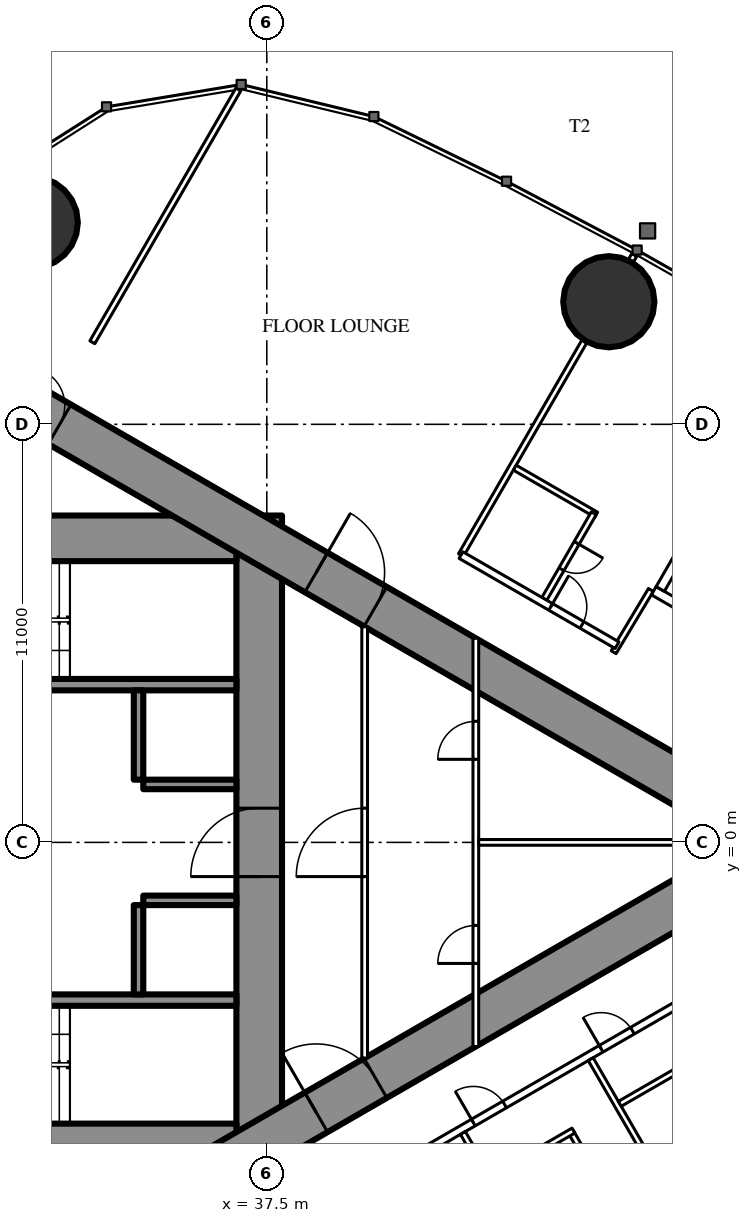
"""IFC4 building model, lengths in metres.
Left out: names, types, materials, properties, quantities, classifications, styles, units other than length and angle.
Written with IfcOpenShell. Run it as: python <this file> out.ifc"""

import sys

from ifc_helpers import new_model, si_unit, direction, frame, frame_2d, origin, origin_2d, place, context, subcontext, project, spatial, rectangle, circle, extrude, element, fill, save


model = new_model("IFC4")
c1 = context("Model", 3, precision=1e-05, world=origin(), true_north=direction((0.0, 1.0)))
c2 = subcontext(c1, "Body", "Model", "MODEL_VIEW")
j1 = project(units=[si_unit("LENGTHUNIT", "METRE"), si_unit("PLANEANGLEUNIT", "RADIAN")], contexts=[c1])
p1 = place(None, origin())
s1 = spatial("IfcSite", under=j1, at=p1, CompositionType="ELEMENT")
p2 = place(p1, origin())
s2 = spatial("IfcBuilding", under=s1, at=p2, CompositionType="ELEMENT")
p3 = place(p2, frame((0.0, 0.0, 240.5)))
s3 = spatial("IfcBuildingStorey", under=s2, at=p3, CompositionType="ELEMENT", Elevation=240.5)
for number, where, z_axis, x_axis in (
    (1, (31.328, 16.311, 0.0), (0.0, 0.0, 1.0), (1.0, 0.0, 0.0)),
    (2, (46.499, 14.226, 0.0), (0.0, 0.0, 1.0), (1.0, 0.0, 0.0)),
):
    element("IfcColumn", number, at=place(p3, frame(where, z_axis=z_axis, x_axis=x_axis)), inside=s3, PredefinedType="COLUMN", context=c2, shape_type="SweptSolid", body=[
        extrude(circle(Radius=1.2, at=origin_2d()), origin(), (0.0, 0.0, 1.0), 3.6),
    ])
p4 = place(p3, frame((37.3, -8.6, 0.0), z_axis=(0.0, 0.0, 1.0), x_axis=(0.0, 1.0, 0.0)))
e3 = element("IfcWall", 3, at=p4, inside=s3, PredefinedType="SHEAR", context=c2, shape_type="SweptSolid", body=[
    extrude(rectangle(XDim=17.2, YDim=1.2, at=frame_2d((8.6, 0.0))), origin(), (0.0, 0.0, 1.0), 3.6),
])
p5 = place(p4, frame((7.7, 0.0, 0.0)))
e4 = element("IfcOpeningElement", 4, at=p5, cuts=e3, PredefinedType="OPENING", context=c2, shape_type="SweptSolid", body=[
    extrude(rectangle(XDim=1.8, YDim=2.2, at=frame_2d((0.9, 1.1))), frame((0.0, 0.61, 0.0), z_axis=(0.0, -1.0, 0.0), x_axis=(1.0, 0.0, 0.0)), (0.0, 0.0, 1.0), 1.22),
])
p6 = place(p3, frame((28.3, -8.0, 0.0), z_axis=(0.0, 0.0, 1.0), x_axis=(1.0, 0.0, 0.0)))
e5 = element("IfcWall", 5, at=p6, inside=s3, PredefinedType="SHEAR", context=c2, shape_type="SweptSolid", body=[
    extrude(rectangle(XDim=8.4, YDim=1.2, at=frame_2d((4.2, 0.0))), origin(), (0.0, 0.0, 1.0), 3.6),
])
p7 = place(p6, frame((0.25, 0.0, 0.0)))
e6 = element("IfcOpeningElement", 6, at=p7, cuts=e5, PredefinedType="OPENING", context=c2, shape_type="SweptSolid", body=[
    extrude(rectangle(XDim=1.0, YDim=2.2, at=frame_2d((0.5, 1.1))), frame((0.0, 0.61, 0.0), z_axis=(0.0, -1.0, 0.0), x_axis=(1.0, 0.0, 0.0)), (0.0, 0.0, 1.0), 1.22),
])
p8 = place(p3, frame((28.3, 8.0, 0.0), z_axis=(0.0, 0.0, 1.0), x_axis=(1.0, 0.0, 0.0)))
e7 = element("IfcWall", 7, at=p8, inside=s3, PredefinedType="SHEAR", context=c2, shape_type="SweptSolid", body=[
    extrude(rectangle(XDim=8.4, YDim=1.2, at=frame_2d((4.2, 0.0))), origin(), (0.0, 0.0, 1.0), 3.6),
])
p9 = place(p8, frame((0.25, 0.0, 0.0)))
e8 = element("IfcOpeningElement", 8, at=p9, cuts=e7, PredefinedType="OPENING", context=c2, shape_type="SweptSolid", body=[
    extrude(rectangle(XDim=1.0, YDim=2.2, at=frame_2d((0.5, 1.1))), frame((0.0, 0.61, 0.0), z_axis=(0.0, -1.0, 0.0), x_axis=(1.0, 0.0, 0.0)), (0.0, 0.0, 1.0), 1.22),
])
for number, where, z_axis, x_axis in (
    (9, (28.3, -4.15, 0.0), (0.0, 0.0, 1.0), (1.0, 0.0, 0.0)),
    (10, (28.3, 4.15, 0.0), (0.0, 0.0, 1.0), (1.0, 0.0, 0.0)),
):
    element("IfcWall", number, at=place(p3, frame(where, z_axis=z_axis, x_axis=x_axis)), inside=s3, PredefinedType="SHEAR", context=c2, shape_type="SweptSolid", body=[
        extrude(rectangle(XDim=8.4, YDim=0.3, at=frame_2d((4.2, 0.0))), origin(), (0.0, 0.0, 1.0), 3.6),
    ])
p10 = place(p3, frame((34.125, -4.0, 0.0), z_axis=(0.0, 0.0, 1.0), x_axis=(0.0, 1.0, 0.0)))
e11 = element("IfcWall", 11, at=p10, inside=s3, PredefinedType="SHEAR", context=c2, shape_type="SweptSolid", body=[
    extrude(rectangle(XDim=2.35, YDim=0.25, at=frame_2d((1.175, 0.0))), origin(), (0.0, 0.0, 1.0), 3.6),
])
p11 = place(p3, frame((34.25, -1.525, 0.0), z_axis=(0.0, 0.0, 1.0), x_axis=(1.0, 0.0, 0.0)))
e12 = element("IfcWall", 12, at=p11, inside=s3, PredefinedType="SHEAR", context=c2, shape_type="SweptSolid", body=[
    extrude(rectangle(XDim=2.45, YDim=0.25, at=frame_2d((1.225, 0.0))), origin(), (0.0, 0.0, 1.0), 3.6),
])
p12 = place(p3, frame((34.125, 1.65, 0.0), z_axis=(0.0, 0.0, 1.0), x_axis=(0.0, 1.0, 0.0)))
e13 = element("IfcWall", 13, at=p12, inside=s3, PredefinedType="SHEAR", context=c2, shape_type="SweptSolid", body=[
    extrude(rectangle(XDim=2.35, YDim=0.25, at=frame_2d((1.175, 0.0))), origin(), (0.0, 0.0, 1.0), 3.6),
])
p13 = place(p3, frame((34.25, 1.525, 0.0), z_axis=(0.0, 0.0, 1.0), x_axis=(1.0, 0.0, 0.0)))
e14 = element("IfcWall", 14, at=p13, inside=s3, PredefinedType="SHEAR", context=c2, shape_type="SweptSolid", body=[
    extrude(rectangle(XDim=2.45, YDim=0.25, at=frame_2d((1.225, 0.0))), origin(), (0.0, 0.0, 1.0), 3.6),
])
p14 = place(p3, frame((27.2, -13.8, 0.0), z_axis=(0.0, 0.0, 1.0), x_axis=(0.866027159892, 0.499996958321, 0.0)))
e15 = element("IfcWall", 15, at=p14, inside=s3, PredefinedType="SHEAR", context=c2, shape_type="SweptSolid", body=[
    extrude(rectangle(XDim=27.947, YDim=1.2, at=frame_2d((13.973, 0.0))), origin(), (0.0, 0.0, 1.0), 3.6),
])
p15 = place(p14, frame((4.6, 0.0, 0.0)))
e16 = element("IfcOpeningElement", 16, at=p15, cuts=e15, PredefinedType="OPENING", context=c2, shape_type="SweptSolid", body=[
    extrude(rectangle(XDim=1.0, YDim=2.2, at=frame_2d((0.5, 1.1))), frame((0.0, 0.61, 0.0), z_axis=(0.0, -1.0, 0.0), x_axis=(1.0, 0.0, 0.0)), (0.0, 0.0, 1.0), 1.22),
])
p16 = place(p14, frame((13.395, 0.0, 0.0)))
e17 = element("IfcOpeningElement", 17, at=p16, cuts=e15, PredefinedType="OPENING", context=c2, shape_type="SweptSolid", body=[
    extrude(rectangle(XDim=1.8, YDim=2.2, at=frame_2d((0.9, 1.1))), frame((0.0, 0.61, 0.0), z_axis=(0.0, -1.0, 0.0), x_axis=(1.0, 0.0, 0.0)), (0.0, 0.0, 1.0), 1.22),
])
p17 = place(p3, frame((27.2, 13.8, 0.0), z_axis=(0.0, 0.0, 1.0), x_axis=(0.866024515034, -0.500001539357, 0.0)))
e18 = element("IfcWall", 18, at=p17, inside=s3, PredefinedType="SHEAR", context=c2, shape_type="SweptSolid", body=[
    extrude(rectangle(XDim=26.907, YDim=1.2, at=frame_2d((13.454, 0.0))), origin(), (0.0, 0.0, 1.0), 3.6),
])
p18 = place(p17, frame((4.6, 0.0, 0.0)))
e19 = element("IfcOpeningElement", 19, at=p18, cuts=e18, PredefinedType="OPENING", context=c2, shape_type="SweptSolid", body=[
    extrude(rectangle(XDim=1.0, YDim=2.2, at=frame_2d((0.5, 1.1))), frame((0.0, 0.61, 0.0), z_axis=(0.0, -1.0, 0.0), x_axis=(1.0, 0.0, 0.0)), (0.0, 0.0, 1.0), 1.22),
])
p19 = place(p17, frame((13.395, 0.0, 0.0)))
e20 = element("IfcOpeningElement", 20, at=p19, cuts=e18, PredefinedType="OPENING", context=c2, shape_type="SweptSolid", body=[
    extrude(rectangle(XDim=1.8, YDim=2.2, at=frame_2d((0.9, 1.1))), frame((0.0, 0.61, 0.0), z_axis=(0.0, -1.0, 0.0), x_axis=(1.0, 0.0, 0.0)), (0.0, 0.0, 1.0), 1.22),
])
p20 = place(p3, frame((28.959, -15.44, 0.0), z_axis=(0.0, 0.0, 1.0), x_axis=(0.866025227435, 0.500000305447, 0.0)))
e21 = element("IfcWall", 21, at=p20, inside=s3, PredefinedType="PARTITIONING", context=c2, shape_type="SweptSolid", body=[
    extrude(rectangle(XDim=30.88, YDim=0.2, at=frame_2d((15.44, 0.0))), origin(), (0.0, 0.0, 1.0), 3.35),
])
p21 = place(p20, frame((1.494, 0.0, 0.0)))
e22 = element("IfcOpeningElement", 22, at=p21, cuts=e21, PredefinedType="OPENING", context=c2, shape_type="SweptSolid", body=[
    extrude(rectangle(XDim=1.8, YDim=2.03, at=frame_2d((0.9, 1.015))), frame((0.0, 0.11, 0.0), z_axis=(0.0, -1.0, 0.0), x_axis=(1.0, 0.0, 0.0)), (0.0, 0.0, 1.0), 0.22),
])
p22 = place(p20, frame((7.687, 0.0, 0.0)))
e23 = element("IfcOpeningElement", 23, at=p22, cuts=e21, PredefinedType="OPENING", context=c2, shape_type="SweptSolid", body=[
    extrude(rectangle(XDim=1.0, YDim=2.2, at=frame_2d((0.5, 1.1))), frame((0.0, 0.11, 0.0), z_axis=(0.0, -1.0, 0.0), x_axis=(1.0, 0.0, 0.0)), (0.0, 0.0, 1.0), 0.22),
])
p23 = place(p20, frame((16.137, 0.0, 0.0)))
e24 = element("IfcOpeningElement", 24, at=p23, cuts=e21, PredefinedType="OPENING", context=c2, shape_type="SweptSolid", body=[
    extrude(rectangle(XDim=0.95, YDim=2.2, at=frame_2d((0.475, 1.1))), frame((0.0, 0.11, 0.0), z_axis=(0.0, -1.0, 0.0), x_axis=(1.0, 0.0, 0.0)), (0.0, 0.0, 1.0), 0.22),
])
p24 = place(p20, frame((20.021, 0.0, 0.0)))
e25 = element("IfcOpeningElement", 25, at=p24, cuts=e21, PredefinedType="OPENING", context=c2, shape_type="SweptSolid", body=[
    extrude(rectangle(XDim=0.95, YDim=2.2, at=frame_2d((0.475, 1.1))), frame((0.0, 0.11, 0.0), z_axis=(0.0, -1.0, 0.0), x_axis=(1.0, 0.0, 0.0)), (0.0, 0.0, 1.0), 0.22),
])
p25 = place(p20, frame((26.253, 0.0, 0.0)))
e26 = element("IfcOpeningElement", 26, at=p25, cuts=e21, PredefinedType="OPENING", context=c2, shape_type="SweptSolid", body=[
    extrude(rectangle(XDim=0.95, YDim=2.2, at=frame_2d((0.475, 1.1))), frame((0.0, 0.11, 0.0), z_axis=(0.0, -1.0, 0.0), x_axis=(1.0, 0.0, 0.0)), (0.0, 0.0, 1.0), 0.22),
])
p26 = place(p3, frame((42.66, -7.646, 0.0), z_axis=(0.0, 0.0, 1.0), x_axis=(0.499996592859, -0.866027370889, 0.0)))
e27 = element("IfcWall", 27, at=p26, inside=s3, PredefinedType="PARTITIONING", context=c2, shape_type="SweptSolid", body=[
    extrude(rectangle(XDim=6.398, YDim=0.15, at=frame_2d((3.199, 0.0))), origin(), (0.0, 0.0, 1.0), 2.45),
])
p27 = place(p3, frame((46.023, -5.704, 0.0), z_axis=(0.0, 0.0, 1.0), x_axis=(0.499984478165, -0.866034365135, 0.0)))
e28 = element("IfcWall", 28, at=p27, inside=s3, PredefinedType="PARTITIONING", context=c2, shape_type="SweptSolid", body=[
    extrude(rectangle(XDim=6.426, YDim=0.15, at=frame_2d((3.213, 0.0))), origin(), (0.0, 0.0, 1.0), 2.45),
])
p28 = place(p3, frame((32.91, 13.159, 0.0), z_axis=(0.0, 0.0, 1.0), x_axis=(0.500014963534, 0.866016764412, 0.0)))
e29 = element("IfcWall", 29, at=p28, inside=s3, PredefinedType="PARTITIONING", context=c2, shape_type="SweptSolid", body=[
    extrude(rectangle(XDim=7.682, YDim=0.15, at=frame_2d((3.841, 0.0))), origin(), (0.0, 0.0, 1.0), 3.35),
])
p29 = place(p3, frame((42.61, 7.559, 0.0), z_axis=(0.0, 0.0, 1.0), x_axis=(0.500014058812, 0.866017286774, 0.0)))
e30 = element("IfcWall", 30, at=p29, inside=s3, PredefinedType="PARTITIONING", context=c2, shape_type="SweptSolid", body=[
    extrude(rectangle(XDim=6.498, YDim=0.15, at=frame_2d((3.249, 0.0))), origin(), (0.0, 0.0, 1.0), 2.45),
])
p30 = place(p3, frame((47.079, 15.3, 0.0), z_axis=(0.0, 0.0, 1.0), x_axis=(0.499212083968, 0.866479829667, 0.0)))
e31 = element("IfcWall", 31, at=p30, inside=s3, PredefinedType="PARTITIONING", context=c2, shape_type="SweptSolid", body=[
    extrude(rectangle(XDim=0.179, YDim=0.15, at=frame_2d((0.09, 0.0))), origin(), (0.0, 0.0, 1.0), 2.45),
])
p31 = place(p3, frame((47.606, 6.642, 0.0), z_axis=(0.0, 0.0, 1.0), x_axis=(-0.51353662755, -0.858067673418, 0.0)))
e32 = element("IfcWall", 32, at=p31, inside=s3, PredefinedType="PARTITIONING", context=c2, shape_type="SweptSolid", body=[
    extrude(rectangle(XDim=1.91, YDim=0.15, at=frame_2d((0.955, 0.0))), origin(), (0.0, 0.0, 1.0), 3.35),
])
p32 = place(p3, frame((45.503, -7.621, 0.0), z_axis=(0.0, 0.0, 1.0), x_axis=(0.500006934395, -0.866021400173, 0.0)))
e33 = element("IfcWall", 33, at=p32, inside=s3, PredefinedType="PARTITIONING", context=c2, shape_type="SweptSolid", body=[
    extrude(rectangle(XDim=2.6, YDim=0.15, at=frame_2d((1.3, 0.0))), origin(), (0.0, 0.0, 1.0), 3.35),
])
p33 = place(p32, frame((0.9, 0.0, 0.0)))
e34 = element("IfcOpeningElement", 34, at=p33, cuts=e33, PredefinedType="OPENING", context=c2, shape_type="SweptSolid", body=[
    extrude(rectangle(XDim=0.8, YDim=2.2, at=frame_2d((0.4, 1.1))), frame((0.0, 0.085, 0.0), z_axis=(0.0, -1.0, 0.0), x_axis=(1.0, 0.0, 0.0)), (0.0, 0.0, 1.0), 0.17),
])
for number, where, z_axis, x_axis in (
    (35, (43.425, -8.821, 0.0), (0.0, 0.0, 1.0), (0.866, 0.5, 0.0)),
    (36, (48.088, -9.13, 0.0), (0.0, 0.0, 1.0), (0.866, 0.5, 0.0)),
    (37, (46.788, -6.879, 0.0), (0.0, 0.0, 1.0), (0.866, 0.5, 0.0)),
    (38, (44.025, 9.86, 0.0), (0.0, 0.0, 1.0), (0.866, -0.5, 0.0)),
):
    element("IfcWall", number, at=place(p3, frame(where, z_axis=z_axis, x_axis=x_axis)), inside=s3, PredefinedType="PARTITIONING", context=c2, shape_type="SweptSolid", body=[
        extrude(rectangle(XDim=2.475, YDim=0.15, at=frame_2d((1.237, 0.0))), origin(), (0.0, 0.0, 1.0), 3.35),
    ])
p34 = place(p3, frame((44.803, 6.408, 0.0), z_axis=(0.0, 0.0, 1.0), x_axis=(0.500047596559, 0.865997922154, 0.0)))
e39 = element("IfcWall", 39, at=p34, inside=s3, PredefinedType="PARTITIONING", context=c2, shape_type="SweptSolid", body=[
    extrude(rectangle(XDim=2.6, YDim=0.15, at=frame_2d((1.3, 0.0))), origin(), (0.0, 0.0, 1.0), 3.35),
])
p35 = place(p34, frame((0.9, 0.0, 0.0)))
e40 = element("IfcOpeningElement", 40, at=p35, cuts=e39, PredefinedType="OPENING", context=c2, shape_type="SweptSolid", body=[
    extrude(rectangle(XDim=0.8, YDim=2.2, at=frame_2d((0.4, 1.1))), frame((0.0, 0.085, 0.0), z_axis=(0.0, -1.0, 0.0), x_axis=(1.0, 0.0, 0.0)), (0.0, 0.0, 1.0), 0.17),
])
p36 = place(p3, frame((42.61, 7.559, 0.0), z_axis=(0.0, 0.0, 1.0), x_axis=(0.866032081755, -0.499988433238, 0.0)))
e41 = element("IfcWall", 41, at=p36, inside=s3, PredefinedType="PARTITIONING", context=c2, shape_type="SweptSolid", body=[
    extrude(rectangle(XDim=4.741, YDim=0.2, at=frame_2d((2.37, 0.0))), origin(), (0.0, 0.0, 1.0), 3.35),
])
p37 = place(p36, frame((2.725, 0.0, 0.0)))
e42 = element("IfcOpeningElement", 42, at=p37, cuts=e41, PredefinedType="OPENING", context=c2, shape_type="SweptSolid", body=[
    extrude(rectangle(XDim=0.95, YDim=2.2, at=frame_2d((0.475, 1.1))), frame((0.0, 0.11, 0.0), z_axis=(0.0, -1.0, 0.0), x_axis=(1.0, 0.0, 0.0)), (0.0, 0.0, 1.0), 0.22),
])
p38 = place(p3, frame((40.075, -5.674, 0.0), z_axis=(0.0, 0.0, 1.0), x_axis=(0.0, 1.0, 0.0)))
e43 = element("IfcWall", 43, at=p38, inside=s3, PredefinedType="PARTITIONING", context=c2, shape_type="SweptSolid", body=[
    extrude(rectangle(XDim=11.348, YDim=0.15, at=frame_2d((5.674, 0.0))), origin(), (0.0, 0.0, 1.0), 3.35),
])
p39 = place(p38, frame((4.774, 0.0, 0.0)))
e44 = element("IfcOpeningElement", 44, at=p39, cuts=e43, PredefinedType="OPENING", context=c2, shape_type="SweptSolid", body=[
    extrude(rectangle(XDim=1.8, YDim=2.2, at=frame_2d((0.9, 1.1))), frame((0.0, 0.085, 0.0), z_axis=(0.0, -1.0, 0.0), x_axis=(1.0, 0.0, 0.0)), (0.0, 0.0, 1.0), 0.17),
])
p40 = place(p3, frame((43.0, -5.371, 0.0), z_axis=(0.0, 0.0, 1.0), x_axis=(0.0, 1.0, 0.0)))
e45 = element("IfcWall", 45, at=p40, inside=s3, PredefinedType="PARTITIONING", context=c2, shape_type="SweptSolid", body=[
    extrude(rectangle(XDim=10.741, YDim=0.15, at=frame_2d((5.371, 0.0))), origin(), (0.0, 0.0, 1.0), 3.35),
])
p41 = place(p40, frame((2.185, 0.0, 0.0)))
e46 = element("IfcOpeningElement", 46, at=p41, cuts=e45, PredefinedType="OPENING", context=c2, shape_type="SweptSolid", body=[
    extrude(rectangle(XDim=1.0, YDim=2.2, at=frame_2d((0.5, 1.1))), frame((0.0, 0.085, 0.0), z_axis=(0.0, -1.0, 0.0), x_axis=(1.0, 0.0, 0.0)), (0.0, 0.0, 1.0), 0.17),
])
p42 = place(p40, frame((7.556, 0.0, 0.0)))
e47 = element("IfcOpeningElement", 47, at=p42, cuts=e45, PredefinedType="OPENING", context=c2, shape_type="SweptSolid", body=[
    extrude(rectangle(XDim=1.0, YDim=2.2, at=frame_2d((0.5, 1.1))), frame((0.0, 0.085, 0.0), z_axis=(0.0, -1.0, 0.0), x_axis=(1.0, 0.0, 0.0)), (0.0, 0.0, 1.0), 0.17),
])
p43 = place(p3, frame((43.075, 0.0, 0.0), z_axis=(0.0, 0.0, 1.0), x_axis=(1.0, 0.0, 0.0)))
e48 = element("IfcWall", 48, at=p43, inside=s3, PredefinedType="PARTITIONING", context=c2, shape_type="SweptSolid", body=[
    extrude(rectangle(XDim=9.227, YDim=0.15, at=frame_2d((4.614, 0.0))), origin(), (0.0, 0.0, 1.0), 2.45),
])
p44 = place(p3, frame((47.681, 6.622, 0.0), z_axis=(0.0, 0.0, 1.0), x_axis=(0.86603344179, -0.499986077507, 0.0)))
e49 = element("IfcWall", 49, at=p44, inside=s3, PredefinedType="PARTITIONING", context=c2, shape_type="SweptSolid", body=[
    extrude(rectangle(XDim=6.6, YDim=0.25, at=frame_2d((3.3, 0.0))), origin(), (0.0, 0.0, 1.0), 3.35),
])
p45 = place(p44, frame((0.75, 0.0, 0.0)))
e50 = element("IfcOpeningElement", 50, at=p45, cuts=e49, PredefinedType="OPENING", context=c2, shape_type="SweptSolid", body=[
    extrude(rectangle(XDim=1.1, YDim=2.2, at=frame_2d((0.55, 1.1))), frame((0.0, 0.135, 0.0), z_axis=(0.0, -1.0, 0.0), x_axis=(1.0, 0.0, 0.0)), (0.0, 0.0, 1.0), 0.27),
])
p46 = place(p44, frame((2.75, 0.0, 0.0)))
e51 = element("IfcOpeningElement", 51, at=p46, cuts=e49, PredefinedType="OPENING", context=c2, shape_type="SweptSolid", body=[
    extrude(rectangle(XDim=1.1, YDim=2.2, at=frame_2d((0.55, 1.1))), frame((0.0, 0.135, 0.0), z_axis=(0.0, -1.0, 0.0), x_axis=(1.0, 0.0, 0.0)), (0.0, 0.0, 1.0), 0.27),
])
p47 = place(p44, frame((4.75, 0.0, 0.0)))
e52 = element("IfcOpeningElement", 52, at=p47, cuts=e49, PredefinedType="OPENING", context=c2, shape_type="SweptSolid", body=[
    extrude(rectangle(XDim=1.1, YDim=2.2, at=frame_2d((0.55, 1.1))), frame((0.0, 0.135, 0.0), z_axis=(0.0, -1.0, 0.0), x_axis=(1.0, 0.0, 0.0)), (0.0, 0.0, 1.0), 0.27),
])
p48 = place(p3, frame((47.852, 6.668, 0.0), z_axis=(0.0, 0.0, 1.0), x_axis=(0.499929347863, 0.866066190972, 0.0)))
e53 = element("IfcWall", 53, at=p48, inside=s3, PredefinedType="PARTITIONING", context=c2, shape_type="SweptSolid", body=[
    extrude(rectangle(XDim=3.201, YDim=0.25, at=frame_2d((1.6, 0.0))), origin(), (0.0, 0.0, 1.0), 3.35),
])
p49 = place(p23, origin())
e54 = element("IfcDoor", 54, at=p49, inside=s3, OperationType="SINGLE_SWING_LEFT", PredefinedType="DOOR", context=c2, shape_type="SweptSolid", body=[
    extrude(rectangle(XDim=0.95, YDim=2.2, at=frame_2d((0.475, 1.1))), frame((0.0, 0.025, 0.0), z_axis=(0.0, -1.0, 0.0), x_axis=(1.0, 0.0, 0.0)), (0.0, 0.0, 1.0), 0.05),
])
fill(e24, e54)
p50 = place(p24, origin())
e55 = element("IfcDoor", 55, at=p50, inside=s3, OperationType="SINGLE_SWING_LEFT", PredefinedType="DOOR", context=c2, shape_type="SweptSolid", body=[
    extrude(rectangle(XDim=0.95, YDim=2.2, at=frame_2d((0.475, 1.1))), frame((0.0, 0.025, 0.0), z_axis=(0.0, -1.0, 0.0), x_axis=(1.0, 0.0, 0.0)), (0.0, 0.0, 1.0), 0.05),
])
fill(e25, e55)
p51 = place(p35, origin())
e56 = element("IfcDoor", 56, at=p51, inside=s3, OperationType="SINGLE_SWING_RIGHT", PredefinedType="DOOR", context=c2, shape_type="SweptSolid", body=[
    extrude(rectangle(XDim=0.8, YDim=2.2, at=frame_2d((0.4, 1.1))), frame((0.0, 0.025, 0.0), z_axis=(0.0, -1.0, 0.0), x_axis=(1.0, 0.0, 0.0)), (0.0, 0.0, 1.0), 0.05),
])
fill(e40, e56)
p52 = place(p37, origin())
e57 = element("IfcDoor", 57, at=p52, inside=s3, OperationType="SINGLE_SWING_LEFT", PredefinedType="DOOR", context=c2, shape_type="SweptSolid", body=[
    extrude(rectangle(XDim=0.95, YDim=2.2, at=frame_2d((0.475, 1.1))), frame((0.0, 0.025, 0.0), z_axis=(0.0, -1.0, 0.0), x_axis=(1.0, 0.0, 0.0)), (0.0, 0.0, 1.0), 0.05),
])
fill(e42, e57)
p53 = place(p39, origin())
e58 = element("IfcDoor", 58, at=p53, inside=s3, OperationType="DOUBLE_DOOR_SINGLE_SWING", PredefinedType="DOOR", context=c2, shape_type="SweptSolid", body=[
    extrude(rectangle(XDim=1.8, YDim=2.2, at=frame_2d((0.9, 1.1))), frame((0.0, 0.025, 0.0), z_axis=(0.0, -1.0, 0.0), x_axis=(1.0, 0.0, 0.0)), (0.0, 0.0, 1.0), 0.05),
])
fill(e44, e58)
p54 = place(p41, origin())
e59 = element("IfcDoor", 59, at=p54, inside=s3, OperationType="SINGLE_SWING_LEFT", PredefinedType="DOOR", context=c2, shape_type="SweptSolid", body=[
    extrude(rectangle(XDim=1.0, YDim=2.2, at=frame_2d((0.5, 1.1))), frame((0.0, 0.025, 0.0), z_axis=(0.0, -1.0, 0.0), x_axis=(1.0, 0.0, 0.0)), (0.0, 0.0, 1.0), 0.05),
])
fill(e46, e59)
p55 = place(p42, origin())
e60 = element("IfcDoor", 60, at=p55, inside=s3, OperationType="SINGLE_SWING_LEFT", PredefinedType="DOOR", context=c2, shape_type="SweptSolid", body=[
    extrude(rectangle(XDim=1.0, YDim=2.2, at=frame_2d((0.5, 1.1))), frame((0.0, 0.025, 0.0), z_axis=(0.0, -1.0, 0.0), x_axis=(1.0, 0.0, 0.0)), (0.0, 0.0, 1.0), 0.05),
])
fill(e47, e60)
p56 = place(p16, origin())
e61 = element("IfcDoor", 61, at=p56, inside=s3, OperationType="DOUBLE_DOOR_SINGLE_SWING", PredefinedType="DOOR", context=c2, shape_type="SweptSolid", body=[
    extrude(rectangle(XDim=1.8, YDim=2.2, at=frame_2d((0.9, 1.1))), frame((0.0, 0.025, 0.0), z_axis=(0.0, -1.0, 0.0), x_axis=(1.0, 0.0, 0.0)), (0.0, 0.0, 1.0), 0.05),
])
fill(e17, e61)
p57 = place(p18, origin())
e62 = element("IfcDoor", 62, at=p57, inside=s3, OperationType="SINGLE_SWING_LEFT", PredefinedType="DOOR", context=c2, shape_type="SweptSolid", body=[
    extrude(rectangle(XDim=1.0, YDim=2.2, at=frame_2d((0.5, 1.1))), frame((0.0, 0.025, 0.0), z_axis=(0.0, -1.0, 0.0), x_axis=(1.0, 0.0, 0.0)), (0.0, 0.0, 1.0), 0.05),
])
fill(e19, e62)
p58 = place(p19, origin())
e63 = element("IfcDoor", 63, at=p58, inside=s3, OperationType="DOUBLE_DOOR_SINGLE_SWING", PredefinedType="DOOR", context=c2, shape_type="SweptSolid", body=[
    extrude(rectangle(XDim=1.8, YDim=2.2, at=frame_2d((0.9, 1.1))), frame((0.0, 0.025, 0.0), z_axis=(0.0, -1.0, 0.0), x_axis=(1.0, 0.0, 0.0)), (0.0, 0.0, 1.0), 0.05),
])
fill(e20, e63)
p59 = place(p5, origin())
e64 = element("IfcDoor", 64, at=p59, inside=s3, OperationType="DOUBLE_DOOR_SINGLE_SWING", PredefinedType="DOOR", context=c2, shape_type="SweptSolid", body=[
    extrude(rectangle(XDim=1.8, YDim=2.2, at=frame_2d((0.9, 1.1))), frame((0.0, 0.025, 0.0), z_axis=(0.0, -1.0, 0.0), x_axis=(1.0, 0.0, 0.0)), (0.0, 0.0, 1.0), 0.05),
])
fill(e4, e64)
save(model, sys.argv[1])
